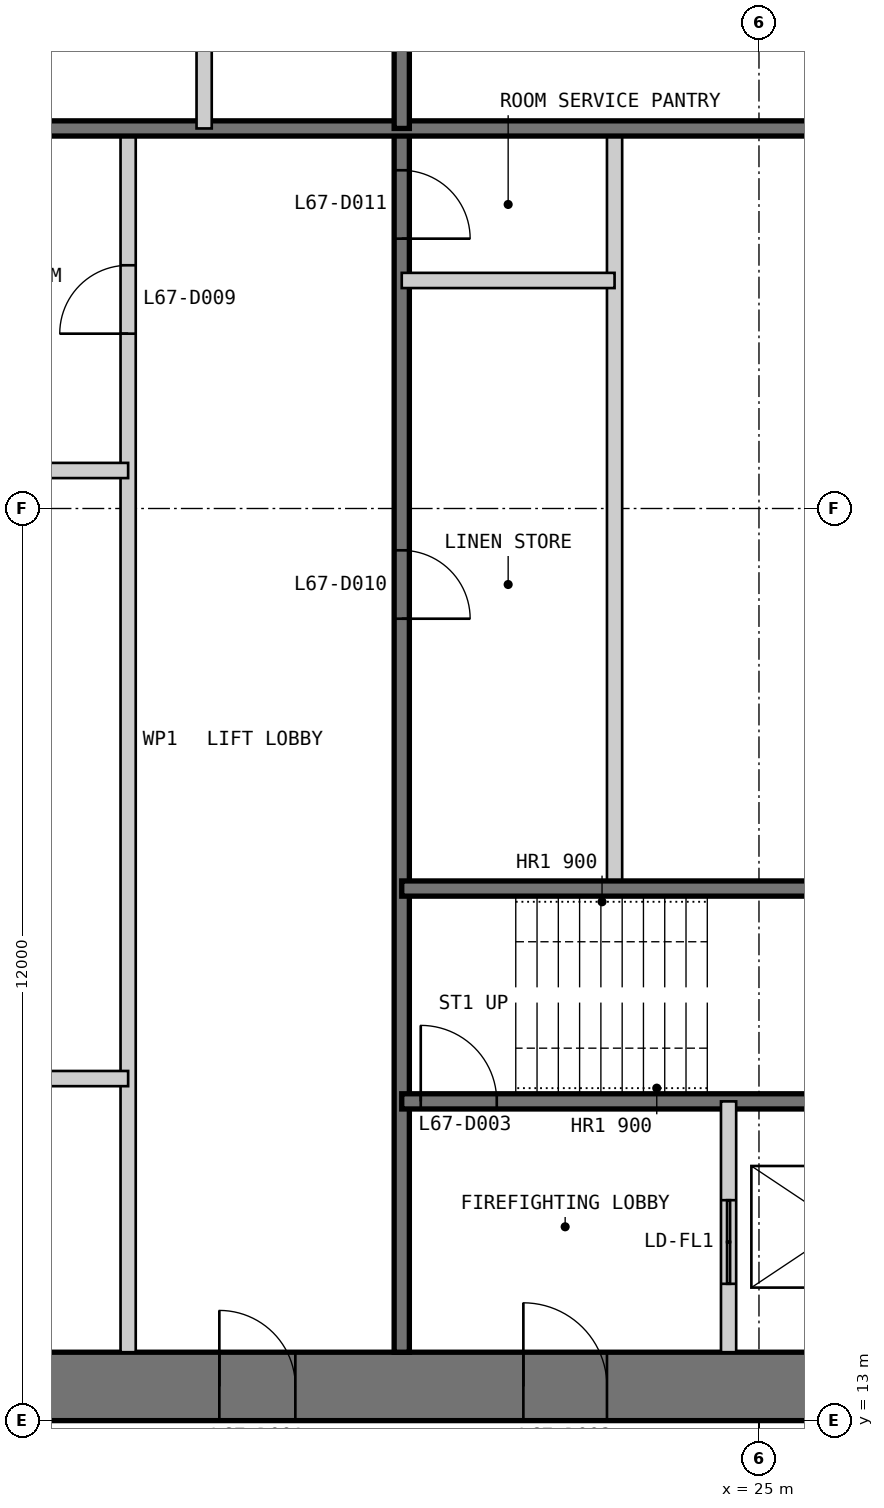
"""IFC4 building model, lengths in metres.
Left out: names, types, materials, properties, quantities, classifications, styles, units other than length and angle.
Written with IfcOpenShell. Run it as: python <this file> out.ifc"""

import sys

from ifc_helpers import new_model, si_unit, direction, frame, frame_2d, origin, place, context, subcontext, project, spatial, polyline, rectangle, outline, extrude, element, fill, save


model = new_model("IFC4")
c1 = context("Model", 3, precision=1e-05, world=origin(), true_north=direction((0.0, 1.0)))
c2 = subcontext(c1, "Body", "Model", "MODEL_VIEW")
j1 = project(units=[si_unit("LENGTHUNIT", "METRE"), si_unit("PLANEANGLEUNIT", "RADIAN")], contexts=[c1])
p1 = place(None, origin())
s1 = spatial("IfcSite", under=j1, at=p1, CompositionType="ELEMENT")
p2 = place(p1, origin())
s2 = spatial("IfcBuilding", under=s1, at=p2, CompositionType="ELEMENT")
p3 = place(p2, frame((0.0, 0.0, 279.8)))
s3 = spatial("IfcBuildingStorey", under=s2, at=p3, CompositionType="ELEMENT", Elevation=279.8)
p4 = place(p3, frame((13.0, 13.45, 0.0), z_axis=(0.0, 0.0, 1.0), x_axis=(1.0, 0.0, 0.0)))
e1 = element("IfcWall", 1, at=p4, inside=s3, PredefinedType="SHEAR", context=c2, shape_type="SweptSolid", body=[
    extrude(outline(polyline([(0.0, -0.45), (24.0, -0.45), (23.1, 0.45), (0.9, 0.45), (0.0, -0.45)])), origin(), (0.0, 0.0, 1.0), 3.4),
])
p5 = place(p4, frame((4.9, 0.0, 0.0)))
e2 = element("IfcOpeningElement", 2, at=p5, cuts=e1, PredefinedType="OPENING", context=c2, shape_type="SweptSolid", body=[
    extrude(rectangle(XDim=1.0, YDim=2.2, at=frame_2d((0.5, 1.1))), frame((0.0, 0.46, 0.0), z_axis=(0.0, -1.0, 0.0), x_axis=(1.0, 0.0, 0.0)), (0.0, 0.0, 1.0), 0.92),
])
p6 = place(p4, frame((8.9, 0.0, 0.0)))
e3 = element("IfcOpeningElement", 3, at=p6, cuts=e1, PredefinedType="OPENING", context=c2, shape_type="SweptSolid", body=[
    extrude(rectangle(XDim=1.1, YDim=2.2, at=frame_2d((0.55, 1.1))), frame((0.0, 0.46, 0.0), z_axis=(0.0, -1.0, 0.0), x_axis=(1.0, 0.0, 0.0)), (0.0, 0.0, 1.0), 0.92),
])
p7 = place(p4, frame((15.05, 0.0, 0.0)))
e4 = element("IfcOpeningElement", 4, at=p7, cuts=e1, PredefinedType="OPENING", context=c2, shape_type="SweptSolid", body=[
    extrude(rectangle(XDim=0.9, YDim=2.2, at=frame_2d((0.45, 1.1))), frame((0.0, 0.46, 0.0), z_axis=(0.0, -1.0, 0.0), x_axis=(1.0, 0.0, 0.0)), (0.0, 0.0, 1.0), 0.92),
])
p8 = place(p4, frame((17.9, 0.0, 0.0)))
e5 = element("IfcOpeningElement", 5, at=p8, cuts=e1, PredefinedType="OPENING", context=c2, shape_type="SweptSolid", body=[
    extrude(rectangle(XDim=1.0, YDim=2.2, at=frame_2d((0.5, 1.1))), frame((0.0, 0.46, 0.0), z_axis=(0.0, -1.0, 0.0), x_axis=(1.0, 0.0, 0.0)), (0.0, 0.0, 1.0), 0.92),
])
p9 = place(p4, frame((21.4, 0.0, 0.0)))
e6 = element("IfcOpeningElement", 6, at=p9, cuts=e1, PredefinedType="OPENING", context=c2, shape_type="SweptSolid", body=[
    extrude(rectangle(XDim=1.0, YDim=2.2, at=frame_2d((0.5, 1.1))), frame((0.0, 0.46, 0.0), z_axis=(0.0, -1.0, 0.0), x_axis=(1.0, 0.0, 0.0)), (0.0, 0.0, 1.0), 0.92),
])
p10 = place(p3, frame((16.7, 13.9, 0.0), z_axis=(0.0, 0.0, 1.0), x_axis=(0.0, 1.0, 0.0)))
e7 = element("IfcWall", 7, at=p10, inside=s3, PredefinedType="PARTITIONING", context=c2, shape_type="SweptSolid", body=[
    extrude(rectangle(XDim=16.1, YDim=0.2, at=frame_2d((8.05, 0.0))), origin(), (0.0, 0.0, 1.0), 3.2),
])
p11 = place(p10, frame((13.4, 0.0, 0.0)))
e8 = element("IfcOpeningElement", 8, at=p11, cuts=e7, PredefinedType="OPENING", context=c2, shape_type="SweptSolid", body=[
    extrude(rectangle(XDim=0.9, YDim=2.2, at=frame_2d((0.45, 1.1))), frame((0.0, 0.11, 0.0), z_axis=(0.0, -1.0, 0.0), x_axis=(1.0, 0.0, 0.0)), (0.0, 0.0, 1.0), 0.22),
])
p12 = place(p3, frame((20.3, 13.9, 0.0), z_axis=(0.0, 0.0, 1.0), x_axis=(0.0, 1.0, 0.0)))
e9 = element("IfcWall", 9, at=p12, inside=s3, PredefinedType="SOLIDWALL", context=c2, shape_type="SweptSolid", body=[
    extrude(rectangle(XDim=16.1, YDim=0.2, at=frame_2d((8.05, 0.0))), origin(), (0.0, 0.0, 1.0), 3.2),
])
p13 = place(p12, frame((9.65, 0.0, 0.0)))
e10 = element("IfcOpeningElement", 10, at=p13, cuts=e9, PredefinedType="OPENING", context=c2, shape_type="SweptSolid", body=[
    extrude(rectangle(XDim=0.9, YDim=2.2, at=frame_2d((0.45, 1.1))), frame((0.0, 0.11, 0.0), z_axis=(0.0, -1.0, 0.0), x_axis=(1.0, 0.0, 0.0)), (0.0, 0.0, 1.0), 0.22),
])
p14 = place(p12, frame((14.65, 0.0, 0.0)))
e11 = element("IfcOpeningElement", 11, at=p14, cuts=e9, PredefinedType="OPENING", context=c2, shape_type="SweptSolid", body=[
    extrude(rectangle(XDim=0.9, YDim=2.2, at=frame_2d((0.45, 1.1))), frame((0.0, 0.11, 0.0), z_axis=(0.0, -1.0, 0.0), x_axis=(1.0, 0.0, 0.0)), (0.0, 0.0, 1.0), 0.22),
])
p15 = place(p3, frame((23.1, 20.0, 0.0), z_axis=(0.0, 0.0, 1.0), x_axis=(0.0, 1.0, 0.0)))
e12 = element("IfcWall", 12, at=p15, inside=s3, PredefinedType="PARTITIONING", context=c2, shape_type="SweptSolid", body=[
    extrude(rectangle(XDim=10.0, YDim=0.2, at=frame_2d((5.0, 0.0))), origin(), (0.0, 0.0, 1.0), 3.2),
])
p16 = place(p3, frame((20.3, 17.2, 0.0), z_axis=(0.0, 0.0, 1.0), x_axis=(1.0, 0.0, 0.0)))
e13 = element("IfcWall", 13, at=p16, inside=s3, PredefinedType="SOLIDWALL", context=c2, shape_type="SweptSolid", body=[
    extrude(rectangle(XDim=9.4, YDim=0.2, at=frame_2d((4.7, 0.0))), origin(), (0.0, 0.0, 1.0), 3.2),
])
p17 = place(p16, frame((0.25, 0.0, 0.0)))
e14 = element("IfcOpeningElement", 14, at=p17, cuts=e13, PredefinedType="OPENING", context=c2, shape_type="SweptSolid", body=[
    extrude(rectangle(XDim=1.0, YDim=2.2, at=frame_2d((0.5, 1.1))), frame((0.0, 0.11, 0.0), z_axis=(0.0, -1.0, 0.0), x_axis=(1.0, 0.0, 0.0)), (0.0, 0.0, 1.0), 0.22),
])
p18 = place(p3, frame((20.3, 20.0, 0.0), z_axis=(0.0, 0.0, 1.0), x_axis=(1.0, 0.0, 0.0)))
e15 = element("IfcWall", 15, at=p18, inside=s3, PredefinedType="SOLIDWALL", context=c2, shape_type="SweptSolid", body=[
    extrude(rectangle(XDim=15.8, YDim=0.2, at=frame_2d((7.9, 0.0))), origin(), (0.0, 0.0, 1.0), 3.2),
])
p19 = place(p3, frame((24.6, 13.9, 0.0), z_axis=(0.0, 0.0, 1.0), x_axis=(0.0, 1.0, 0.0)))
e16 = element("IfcWall", 16, at=p19, inside=s3, PredefinedType="PARTITIONING", context=c2, shape_type="SweptSolid", body=[
    extrude(rectangle(XDim=3.3, YDim=0.2, at=frame_2d((1.65, 0.0))), origin(), (0.0, 0.0, 1.0), 3.2),
])
p20 = place(p19, frame((0.9, 0.0, 0.0)))
e17 = element("IfcOpeningElement", 17, at=p20, cuts=e16, PredefinedType="OPENING", context=c2, shape_type="SweptSolid", body=[
    extrude(rectangle(XDim=1.1, YDim=2.2, at=frame_2d((0.55, 1.1))), frame((0.0, 0.11, 0.0), z_axis=(0.0, -1.0, 0.0), x_axis=(1.0, 0.0, 0.0)), (0.0, 0.0, 1.0), 0.22),
])
for number, where, z_axis, x_axis in (
    (18, (13.9, 17.5, 0.0), (0.0, 0.0, 1.0), (1.0, 0.0, 0.0)),
    (19, (13.9, 25.5, 0.0), (0.0, 0.0, 1.0), (1.0, 0.0, 0.0)),
    (20, (20.3, 28.0, 0.0), (0.0, 0.0, 1.0), (1.0, 0.0, 0.0)),
):
    element("IfcWall", number, at=place(p3, frame(where, z_axis=z_axis, x_axis=x_axis)), inside=s3, PredefinedType="PARTITIONING", context=c2, shape_type="SweptSolid", body=[
        extrude(rectangle(XDim=2.8, YDim=0.2, at=frame_2d((1.4, 0.0))), origin(), (0.0, 0.0, 1.0), 3.2),
    ])
p21 = place(p3, frame((29.7, 30.0, 0.0), z_axis=(0.0, 0.0, 1.0), x_axis=(-1.0, 0.0, 0.0)))
e21 = element("IfcWall", 21, at=p21, inside=s3, PredefinedType="SOLIDWALL", context=c2, shape_type="SweptSolid", body=[
    extrude(rectangle(XDim=15.8, YDim=0.2, at=frame_2d((7.9, 0.0))), origin(), (0.0, 0.0, 1.0), 3.2),
])
p22 = place(p3, frame((20.3, 36.1, 0.0), z_axis=(0.0, 0.0, 1.0), x_axis=(0.0, -1.0, 0.0)))
e22 = element("IfcWall", 22, at=p22, inside=s3, PredefinedType="SOLIDWALL", context=c2, shape_type="SweptSolid", body=[
    extrude(rectangle(XDim=6.1, YDim=0.2, at=frame_2d((3.05, 0.0))), origin(), (0.0, 0.0, 1.0), 3.2),
])
p23 = place(p3, frame((17.7, 36.1, 0.0), z_axis=(0.0, 0.0, 1.0), x_axis=(0.0, -1.0, 0.0)))
e23 = element("IfcWall", 23, at=p23, inside=s3, PredefinedType="PARTITIONING", context=c2, shape_type="SweptSolid", body=[
    extrude(rectangle(XDim=6.1, YDim=0.2, at=frame_2d((3.05, 0.0))), origin(), (0.0, 0.0, 1.0), 3.2),
])
p24 = place(p5, origin())
e24 = element("IfcDoor", 24, at=p24, inside=s3, OperationType="SINGLE_SWING_LEFT", PredefinedType="DOOR", context=c2, shape_type="SweptSolid", body=[
    extrude(rectangle(XDim=1.0, YDim=2.2, at=frame_2d((0.5, 1.1))), frame((0.0, 0.025, 0.0), z_axis=(0.0, -1.0, 0.0), x_axis=(1.0, 0.0, 0.0)), (0.0, 0.0, 1.0), 0.05),
    extrude(outline(polyline([(0.0, 0.0), (0.04, 0.0), (0.04, 2.16), (0.96, 2.16), (0.96, 0.0), (1.0, 0.0), (1.0, 2.2), (0.0, 2.2), (0.0, 0.0)])), frame((0.0, 0.3, 0.0), z_axis=(0.0, -1.0, 0.0), x_axis=(1.0, 0.0, 0.0)), (0.0, 0.0, 1.0), 0.6),
])
fill(e2, e24)
p25 = place(p6, origin())
e25 = element("IfcDoor", 25, at=p25, inside=s3, OperationType="SINGLE_SWING_LEFT", PredefinedType="DOOR", context=c2, shape_type="SweptSolid", body=[
    extrude(rectangle(XDim=1.1, YDim=2.2, at=frame_2d((0.55, 1.1))), frame((0.0, 0.025, 0.0), z_axis=(0.0, -1.0, 0.0), x_axis=(1.0, 0.0, 0.0)), (0.0, 0.0, 1.0), 0.05),
    extrude(outline(polyline([(0.0, 0.0), (0.04, 0.0), (0.04, 2.16), (1.06, 2.16), (1.06, 0.0), (1.1, 0.0), (1.1, 2.2), (0.0, 2.2), (0.0, 0.0)])), frame((0.0, 0.3, 0.0), z_axis=(0.0, -1.0, 0.0), x_axis=(1.0, 0.0, 0.0)), (0.0, 0.0, 1.0), 0.6),
])
fill(e3, e25)
p26 = place(p17, origin())
e26 = element("IfcDoor", 26, at=p26, inside=s3, OperationType="SINGLE_SWING_LEFT", PredefinedType="DOOR", context=c2, shape_type="SweptSolid", body=[
    extrude(rectangle(XDim=1.0, YDim=2.2, at=frame_2d((0.5, 1.1))), frame((0.0, 0.025, 0.0), z_axis=(0.0, -1.0, 0.0), x_axis=(1.0, 0.0, 0.0)), (0.0, 0.0, 1.0), 0.05),
])
fill(e14, e26)
p27 = place(p11, origin())
e27 = element("IfcDoor", 27, at=p27, inside=s3, OperationType="SINGLE_SWING_LEFT", PredefinedType="DOOR", context=c2, shape_type="SweptSolid", body=[
    extrude(rectangle(XDim=0.9, YDim=2.2, at=frame_2d((0.45, 1.1))), frame((0.0, 0.025, 0.0), z_axis=(0.0, -1.0, 0.0), x_axis=(1.0, 0.0, 0.0)), (0.0, 0.0, 1.0), 0.05),
])
fill(e8, e27)
p28 = place(p13, frame((0.9, 0.0, 0.0), z_axis=(0.0, 0.0, 1.0), x_axis=(-1.0, 0.0, 0.0)))
e28 = element("IfcDoor", 28, at=p28, inside=s3, OperationType="SINGLE_SWING_RIGHT", PredefinedType="DOOR", context=c2, shape_type="SweptSolid", body=[
    extrude(rectangle(XDim=0.9, YDim=2.2, at=frame_2d((0.45, 1.1))), frame((0.0, 0.025, 0.0), z_axis=(0.0, -1.0, 0.0), x_axis=(1.0, 0.0, 0.0)), (0.0, 0.0, 1.0), 0.05),
])
fill(e10, e28)
p29 = place(p14, frame((0.9, 0.0, 0.0), z_axis=(0.0, 0.0, 1.0), x_axis=(-1.0, 0.0, 0.0)))
e29 = element("IfcDoor", 29, at=p29, inside=s3, OperationType="SINGLE_SWING_RIGHT", PredefinedType="DOOR", context=c2, shape_type="SweptSolid", body=[
    extrude(rectangle(XDim=0.9, YDim=2.2, at=frame_2d((0.45, 1.1))), frame((0.0, 0.025, 0.0), z_axis=(0.0, -1.0, 0.0), x_axis=(1.0, 0.0, 0.0)), (0.0, 0.0, 1.0), 0.05),
])
fill(e11, e29)
p30 = place(p20, origin())
e30 = element("IfcDoor", 30, at=p30, inside=s3, OperationType="DOUBLE_DOOR_SLIDING", PredefinedType="DOOR", context=c2, shape_type="SweptSolid", body=[
    extrude(rectangle(XDim=1.1, YDim=2.2, at=frame_2d((0.55, 1.1))), frame((0.0, 0.025, 0.0), z_axis=(0.0, -1.0, 0.0), x_axis=(1.0, 0.0, 0.0)), (0.0, 0.0, 1.0), 0.05),
])
fill(e17, e30)
save(model, sys.argv[1])
